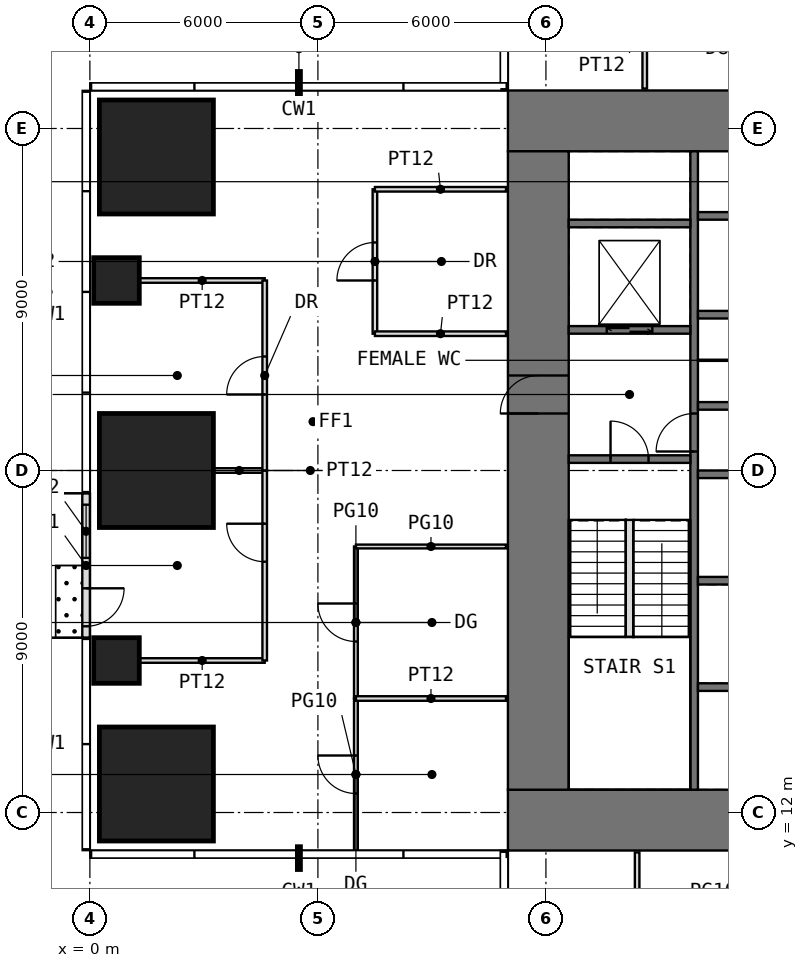
"""IFC4 building model, lengths in metres.
Left out: names, types, materials, properties, quantities, classifications, styles, units other than length and angle.
Written with IfcOpenShell. Run it as: python <this file> out.ifc"""

import sys

from ifc_helpers import new_model, si_unit, direction, frame, frame_2d, origin, origin_2d, place, context, subcontext, project, spatial, rectangle, extrude, element, fill, save


model = new_model("IFC4")
c1 = context("Model", 3, precision=1e-05, world=origin(), true_north=direction((0.0, 1.0)))
c2 = subcontext(c1, "Body", "Model", "MODEL_VIEW")
j1 = project(units=[si_unit("LENGTHUNIT", "METRE"), si_unit("PLANEANGLEUNIT", "RADIAN")], contexts=[c1])
p1 = place(None, origin())
s1 = spatial("IfcSite", under=j1, at=p1, CompositionType="ELEMENT")
p2 = place(p1, origin())
s2 = spatial("IfcBuilding", under=s1, at=p2, CompositionType="ELEMENT")
p3 = place(p2, frame((0.0, 0.0, 104.5)))
s3 = spatial("IfcBuildingStorey", under=s2, at=p3, CompositionType="ELEMENT", Elevation=104.5)
p4 = place(p3, frame((1.75, 12.75, 0.0), z_axis=(0.0, 0.0, 1.0), x_axis=(1.0, 0.0, 0.0)))
e1 = element("IfcColumn", 1, at=p4, inside=s3, PredefinedType="COLUMN", context=c2, shape_type="SweptSolid", body=[
    extrude(rectangle(XDim=3.0, YDim=3.0, at=origin_2d()), origin(), (0.0, 0.0, 1.0), 4.0),
])
p5 = place(p3, frame((0.7, 16.0, 0.0), z_axis=(0.0, 0.0, 1.0), x_axis=(1.0, 0.0, 0.0)))
e2 = element("IfcColumn", 2, at=p5, inside=s3, PredefinedType="COLUMN", context=c2, shape_type="SweptSolid", body=[
    extrude(rectangle(XDim=1.2, YDim=1.2, at=origin_2d()), origin(), (0.0, 0.0, 1.0), 4.0),
])
p6 = place(p3, frame((1.75, 21.0, 0.0), z_axis=(0.0, 0.0, 1.0), x_axis=(1.0, 0.0, 0.0)))
e3 = element("IfcColumn", 3, at=p6, inside=s3, PredefinedType="COLUMN", context=c2, shape_type="SweptSolid", body=[
    extrude(rectangle(XDim=3.0, YDim=3.0, at=origin_2d()), origin(), (0.0, 0.0, 1.0), 4.0),
])
p7 = place(p3, frame((0.7, 26.0, 0.0), z_axis=(0.0, 0.0, 1.0), x_axis=(1.0, 0.0, 0.0)))
e4 = element("IfcColumn", 4, at=p7, inside=s3, PredefinedType="COLUMN", context=c2, shape_type="SweptSolid", body=[
    extrude(rectangle(XDim=1.2, YDim=1.2, at=origin_2d()), origin(), (0.0, 0.0, 1.0), 4.0),
])
p8 = place(p3, frame((1.75, 29.25, 0.0), z_axis=(0.0, 0.0, 1.0), x_axis=(1.0, 0.0, 0.0)))
e5 = element("IfcColumn", 5, at=p8, inside=s3, PredefinedType="COLUMN", context=c2, shape_type="SweptSolid", body=[
    extrude(rectangle(XDim=3.0, YDim=3.0, at=origin_2d()), origin(), (0.0, 0.0, 1.0), 4.0),
])
p9 = place(p3, frame((-0.1, 20.4, 0.0), z_axis=(0.0, 0.0, 1.0), x_axis=(0.0, -1.0, 0.0)))
e6 = element("IfcWall", 6, at=p9, inside=s3, PredefinedType="USERDEFINED", context=c2, shape_type="SweptSolid", body=[
    extrude(rectangle(XDim=3.8, YDim=0.2, at=frame_2d((1.9, 0.0))), origin(), (0.0, 0.0, 1.0), 3.75),
])
p10 = place(p9, frame((2.5, 0.0, 0.0)))
e7 = element("IfcOpeningElement", 7, at=p10, cuts=e6, PredefinedType="OPENING", context=c2, shape_type="SweptSolid", body=[
    extrude(rectangle(XDim=1.0, YDim=2.4, at=frame_2d((0.5, 1.2))), frame((0.0, 0.11, 0.0), z_axis=(0.0, -1.0, 0.0), x_axis=(1.0, 0.0, 0.0)), (0.0, 0.0, 1.0), 0.22),
])
p11 = place(p9, frame((0.3, 0.0, 0.3)))
e8 = element("IfcOpeningElement", 8, at=p11, cuts=e6, PredefinedType="OPENING", context=c2, shape_type="SweptSolid", body=[
    extrude(rectangle(XDim=1.4, YDim=2.7, at=frame_2d((0.7, 1.35))), frame((0.0, 0.11, 0.0), z_axis=(0.0, -1.0, 0.0), x_axis=(1.0, 0.0, 0.0)), (0.0, 0.0, 1.0), 0.22),
])
p12 = place(p3, frame((11.0, 11.8, -0.05), z_axis=(0.0, 0.0, 1.0), x_axis=(1.0, 0.0, 0.0)))
e9 = element("IfcWall", 9, at=p12, inside=s3, PredefinedType="SHEAR", context=c2, shape_type="SweptSolid", body=[
    extrude(rectangle(XDim=20.0, YDim=1.6, at=frame_2d((10.0, 0.0))), origin(), (0.0, 0.0, 1.0), 4.0),
])
p13 = place(p12, frame((9.0, 0.0, 0.05)))
e10 = element("IfcOpeningElement", 10, at=p13, cuts=e9, PredefinedType="OPENING", context=c2, shape_type="SweptSolid", body=[
    extrude(rectangle(XDim=2.0, YDim=2.2, at=frame_2d((1.0, 1.1))), frame((0.0, 0.81, 0.0), z_axis=(0.0, -1.0, 0.0), x_axis=(1.0, 0.0, 0.0)), (0.0, 0.0, 1.0), 1.62),
])
p14 = place(p3, frame((11.0, 30.2, -0.05), z_axis=(0.0, 0.0, 1.0), x_axis=(1.0, 0.0, 0.0)))
e11 = element("IfcWall", 11, at=p14, inside=s3, PredefinedType="SHEAR", context=c2, shape_type="SweptSolid", body=[
    extrude(rectangle(XDim=20.0, YDim=1.6, at=frame_2d((10.0, 0.0))), origin(), (0.0, 0.0, 1.0), 4.0),
])
p15 = place(p14, frame((9.0, 0.0, 0.05)))
e12 = element("IfcOpeningElement", 12, at=p15, cuts=e11, PredefinedType="OPENING", context=c2, shape_type="SweptSolid", body=[
    extrude(rectangle(XDim=2.0, YDim=2.2, at=frame_2d((1.0, 1.1))), frame((0.0, 0.81, 0.0), z_axis=(0.0, -1.0, 0.0), x_axis=(1.0, 0.0, 0.0)), (0.0, 0.0, 1.0), 1.62),
])
p16 = place(p3, frame((11.8, 12.6, -0.05), z_axis=(0.0, 0.0, 1.0), x_axis=(0.0, 1.0, 0.0)))
e13 = element("IfcWall", 13, at=p16, inside=s3, PredefinedType="SHEAR", context=c2, shape_type="SweptSolid", body=[
    extrude(rectangle(XDim=16.8, YDim=1.6, at=frame_2d((8.4, 0.0))), origin(), (0.0, 0.0, 1.0), 4.0),
])
p17 = place(p16, frame((9.9, 0.0, 0.05)))
e14 = element("IfcOpeningElement", 14, at=p17, cuts=e13, PredefinedType="OPENING", context=c2, shape_type="SweptSolid", body=[
    extrude(rectangle(XDim=1.0, YDim=2.2, at=frame_2d((0.5, 1.1))), frame((0.0, 0.81, 0.0), z_axis=(0.0, -1.0, 0.0), x_axis=(1.0, 0.0, 0.0)), (0.0, 0.0, 1.0), 1.62),
])
p18 = place(p3, frame((15.9, 12.6, -0.05), z_axis=(0.0, 0.0, 1.0), x_axis=(0.0, 1.0, 0.0)))
e15 = element("IfcWall", 15, at=p18, inside=s3, PredefinedType="SHEAR", context=c2, shape_type="SweptSolid", body=[
    extrude(rectangle(XDim=16.8, YDim=0.2, at=frame_2d((8.4, 0.0))), origin(), (0.0, 0.0, 1.0), 4.0),
])
p19 = place(p18, frame((8.9, 0.0, 0.05)))
e16 = element("IfcOpeningElement", 16, at=p19, cuts=e15, PredefinedType="OPENING", context=c2, shape_type="SweptSolid", body=[
    extrude(rectangle(XDim=1.0, YDim=2.2, at=frame_2d((0.5, 1.1))), frame((0.0, 0.11, 0.0), z_axis=(0.0, -1.0, 0.0), x_axis=(1.0, 0.0, 0.0)), (0.0, 0.0, 1.0), 0.22),
])
p20 = place(p3, frame((12.6, 21.3, -0.05), z_axis=(0.0, 0.0, 1.0), x_axis=(1.0, 0.0, 0.0)))
e17 = element("IfcWall", 17, at=p20, inside=s3, PredefinedType="SHEAR", context=c2, shape_type="SweptSolid", body=[
    extrude(rectangle(XDim=3.2, YDim=0.2, at=frame_2d((1.6, 0.0))), origin(), (0.0, 0.0, 1.0), 4.0),
])
p21 = place(p20, frame((1.1, 0.0, 0.05)))
e18 = element("IfcOpeningElement", 18, at=p21, cuts=e17, PredefinedType="OPENING", context=c2, shape_type="SweptSolid", body=[
    extrude(rectangle(XDim=1.0, YDim=2.2, at=frame_2d((0.5, 1.1))), frame((0.0, 0.11, 0.0), z_axis=(0.0, -1.0, 0.0), x_axis=(1.0, 0.0, 0.0)), (0.0, 0.0, 1.0), 0.22),
])
p22 = place(p3, frame((12.6, 24.7, -0.05), z_axis=(0.0, 0.0, 1.0), x_axis=(1.0, 0.0, 0.0)))
e19 = element("IfcWall", 19, at=p22, inside=s3, PredefinedType="SHEAR", context=c2, shape_type="SweptSolid", body=[
    extrude(rectangle(XDim=3.2, YDim=0.2, at=frame_2d((1.6, 0.0))), origin(), (0.0, 0.0, 1.0), 4.0),
])
p23 = place(p22, frame((1.0, 0.0, 0.05)))
e20 = element("IfcOpeningElement", 20, at=p23, cuts=e19, PredefinedType="OPENING", context=c2, shape_type="SweptSolid", body=[
    extrude(rectangle(XDim=1.2, YDim=2.2, at=frame_2d((0.6, 1.1))), frame((0.0, 0.11, 0.0), z_axis=(0.0, -1.0, 0.0), x_axis=(1.0, 0.0, 0.0)), (0.0, 0.0, 1.0), 0.22),
])
for number, where, z_axis, x_axis in (
    (21, (12.6, 27.5, -0.05), (0.0, 0.0, 1.0), (1.0, 0.0, 0.0)),
    (22, (16.0, 15.3, -0.05), (0.0, 0.0, 1.0), (1.0, 0.0, 0.0)),
    (23, (16.0, 18.1, -0.05), (0.0, 0.0, 1.0), (1.0, 0.0, 0.0)),
    (24, (16.0, 20.9, -0.05), (0.0, 0.0, 1.0), (1.0, 0.0, 0.0)),
    (25, (16.0, 22.7, -0.05), (0.0, 0.0, 1.0), (1.0, 0.0, 0.0)),
    (26, (16.0, 25.1, -0.05), (0.0, 0.0, 1.0), (1.0, 0.0, 0.0)),
    (27, (16.0, 27.7, -0.05), (0.0, 0.0, 1.0), (1.0, 0.0, 0.0)),
):
    element("IfcWall", number, at=place(p3, frame(where, z_axis=z_axis, x_axis=x_axis)), inside=s3, PredefinedType="SHEAR", context=c2, shape_type="SweptSolid", body=[
        extrude(rectangle(XDim=3.2, YDim=0.2, at=frame_2d((1.6, 0.0))), origin(), (0.0, 0.0, 1.0), 4.0),
    ])
p24 = place(p3, frame((16.0, 23.9, 0.0), z_axis=(0.0, 0.0, 1.0), x_axis=(1.0, 0.0, 0.0)))
e28 = element("IfcWall", 28, at=p24, inside=s3, PredefinedType="PARTITIONING", context=c2, shape_type="SweptSolid", body=[
    extrude(rectangle(XDim=1.4, YDim=0.03, at=frame_2d((0.7, 0.0))), origin(), (0.0, 0.0, 1.0), 3.75),
])
for number, where, z_axis, x_axis in (
    (29, (1.31, 16.0, 0.0), (0.0, 0.0, 1.0), (1.0, 0.0, 0.0)),
    (30, (1.31, 26.0, 0.0), (0.0, 0.0, 1.0), (1.0, 0.0, 0.0)),
):
    element("IfcWall", number, at=place(p3, frame(where, z_axis=z_axis, x_axis=x_axis)), inside=s3, PredefinedType="PARTITIONING", context=c2, shape_type="SweptSolid", body=[
        extrude(rectangle(XDim=3.29, YDim=0.12, at=frame_2d((1.645, 0.0))), origin(), (0.0, 0.0, 1.0), 3.75),
    ])
p25 = place(p3, frame((3.26, 21.0, 0.0), z_axis=(0.0, 0.0, 1.0), x_axis=(1.0, 0.0, 0.0)))
e31 = element("IfcWall", 31, at=p25, inside=s3, PredefinedType="PARTITIONING", context=c2, shape_type="SweptSolid", body=[
    extrude(rectangle(XDim=1.34, YDim=0.12, at=frame_2d((0.67, 0.0))), origin(), (0.0, 0.0, 1.0), 3.75),
])
p26 = place(p3, frame((4.6, 16.0, 0.0), z_axis=(0.0, 0.0, 1.0), x_axis=(0.0, 1.0, 0.0)))
e32 = element("IfcWall", 32, at=p26, inside=s3, PredefinedType="PARTITIONING", context=c2, shape_type="SweptSolid", body=[
    extrude(rectangle(XDim=5.0, YDim=0.12, at=frame_2d((2.5, 0.0))), origin(), (0.0, 0.0, 1.0), 3.75),
])
p27 = place(p26, frame((2.6, 0.0, 0.0)))
e33 = element("IfcOpeningElement", 33, at=p27, cuts=e32, PredefinedType="OPENING", context=c2, shape_type="SweptSolid", body=[
    extrude(rectangle(XDim=1.0, YDim=2.2, at=frame_2d((0.5, 1.1))), frame((0.0, 0.07, 0.0), z_axis=(0.0, -1.0, 0.0), x_axis=(1.0, 0.0, 0.0)), (0.0, 0.0, 1.0), 0.14),
])
p28 = place(p3, frame((4.6, 21.0, 0.0), z_axis=(0.0, 0.0, 1.0), x_axis=(0.0, 1.0, 0.0)))
e34 = element("IfcWall", 34, at=p28, inside=s3, PredefinedType="PARTITIONING", context=c2, shape_type="SweptSolid", body=[
    extrude(rectangle(XDim=5.0, YDim=0.12, at=frame_2d((2.5, 0.0))), origin(), (0.0, 0.0, 1.0), 3.75),
])
p29 = place(p28, frame((2.0, 0.0, 0.0)))
e35 = element("IfcOpeningElement", 35, at=p29, cuts=e34, PredefinedType="OPENING", context=c2, shape_type="SweptSolid", body=[
    extrude(rectangle(XDim=1.0, YDim=2.2, at=frame_2d((0.5, 1.1))), frame((0.0, 0.07, 0.0), z_axis=(0.0, -1.0, 0.0), x_axis=(1.0, 0.0, 0.0)), (0.0, 0.0, 1.0), 0.14),
])
p30 = place(p3, frame((7.0, 11.0, 0.0), z_axis=(0.0, 0.0, 1.0), x_axis=(0.0, 1.0, 0.0)))
e36 = element("IfcWall", 36, at=p30, inside=s3, PredefinedType="PARTITIONING", context=c2, shape_type="SweptSolid", body=[
    extrude(rectangle(XDim=4.0, YDim=0.1, at=frame_2d((2.0, 0.0))), origin(), (0.0, 0.0, 1.0), 3.75),
])
p31 = place(p30, frame((1.5, 0.0, 0.0)))
e37 = element("IfcOpeningElement", 37, at=p31, cuts=e36, PredefinedType="OPENING", context=c2, shape_type="SweptSolid", body=[
    extrude(rectangle(XDim=1.0, YDim=2.4, at=frame_2d((0.5, 1.2))), frame((0.0, 0.06, 0.0), z_axis=(0.0, -1.0, 0.0), x_axis=(1.0, 0.0, 0.0)), (0.0, 0.0, 1.0), 0.12),
])
p32 = place(p3, frame((7.0, 15.0, 0.0), z_axis=(0.0, 0.0, 1.0), x_axis=(0.0, 1.0, 0.0)))
e38 = element("IfcWall", 38, at=p32, inside=s3, PredefinedType="PARTITIONING", context=c2, shape_type="SweptSolid", body=[
    extrude(rectangle(XDim=4.0, YDim=0.1, at=frame_2d((2.0, 0.0))), origin(), (0.0, 0.0, 1.0), 3.75),
])
p33 = place(p32, frame((1.5, 0.0, 0.0)))
e39 = element("IfcOpeningElement", 39, at=p33, cuts=e38, PredefinedType="OPENING", context=c2, shape_type="SweptSolid", body=[
    extrude(rectangle(XDim=1.0, YDim=2.4, at=frame_2d((0.5, 1.2))), frame((0.0, 0.06, 0.0), z_axis=(0.0, -1.0, 0.0), x_axis=(1.0, 0.0, 0.0)), (0.0, 0.0, 1.0), 0.12),
])
p34 = place(p3, frame((7.0, 15.0, 0.0), z_axis=(0.0, 0.0, 1.0), x_axis=(1.0, 0.0, 0.0)))
e40 = element("IfcWall", 40, at=p34, inside=s3, PredefinedType="PARTITIONING", context=c2, shape_type="SweptSolid", body=[
    extrude(rectangle(XDim=3.95, YDim=0.12, at=frame_2d((1.975, 0.0))), origin(), (0.0, 0.0, 1.0), 3.75),
])
p35 = place(p3, frame((7.0, 19.0, 0.0), z_axis=(0.0, 0.0, 1.0), x_axis=(1.0, 0.0, 0.0)))
e41 = element("IfcWall", 41, at=p35, inside=s3, PredefinedType="PARTITIONING", context=c2, shape_type="SweptSolid", body=[
    extrude(rectangle(XDim=3.95, YDim=0.1, at=frame_2d((1.975, 0.0))), origin(), (0.0, 0.0, 1.0), 3.75),
])
p36 = place(p3, frame((7.5, 24.6, 0.0), z_axis=(0.0, 0.0, 1.0), x_axis=(0.0, 1.0, 0.0)))
e42 = element("IfcWall", 42, at=p36, inside=s3, PredefinedType="PARTITIONING", context=c2, shape_type="SweptSolid", body=[
    extrude(rectangle(XDim=3.8, YDim=0.12, at=frame_2d((1.9, 0.0))), origin(), (0.0, 0.0, 1.0), 3.75),
])
p37 = place(p36, frame((1.4, 0.0, 0.0)))
e43 = element("IfcOpeningElement", 43, at=p37, cuts=e42, PredefinedType="OPENING", context=c2, shape_type="SweptSolid", body=[
    extrude(rectangle(XDim=1.0, YDim=2.2, at=frame_2d((0.5, 1.1))), frame((0.0, 0.07, 0.0), z_axis=(0.0, -1.0, 0.0), x_axis=(1.0, 0.0, 0.0)), (0.0, 0.0, 1.0), 0.14),
])
for number, where, z_axis, x_axis in (
    (44, (7.5, 24.6, 0.0), (0.0, 0.0, 1.0), (1.0, 0.0, 0.0)),
    (45, (7.5, 28.4, 0.0), (0.0, 0.0, 1.0), (1.0, 0.0, 0.0)),
):
    element("IfcWall", number, at=place(p3, frame(where, z_axis=z_axis, x_axis=x_axis)), inside=s3, PredefinedType="PARTITIONING", context=c2, shape_type="SweptSolid", body=[
        extrude(rectangle(XDim=3.45, YDim=0.12, at=frame_2d((1.725, 0.0))), origin(), (0.0, 0.0, 1.0), 3.75),
    ])
p38 = place(p3, frame((14.4, 7.0, 0.0), z_axis=(0.0, 0.0, 1.0), x_axis=(0.0, 1.0, 0.0)))
e46 = element("IfcWall", 46, at=p38, inside=s3, PredefinedType="PARTITIONING", context=c2, shape_type="SweptSolid", body=[
    extrude(rectangle(XDim=3.95, YDim=0.12, at=frame_2d((1.975, 0.0))), origin(), (0.0, 0.0, 1.0), 3.75),
])
p39 = place(p3, frame((14.6, 31.05, 0.0), z_axis=(0.0, 0.0, 1.0), x_axis=(0.0, 1.0, 0.0)))
e47 = element("IfcWall", 47, at=p39, inside=s3, PredefinedType="PARTITIONING", context=c2, shape_type="SweptSolid", body=[
    extrude(rectangle(XDim=3.45, YDim=0.12, at=frame_2d((1.725, 0.0))), origin(), (0.0, 0.0, 1.0), 3.75),
])
p40 = place(p3, frame((14.2, 16.62, 0.0), z_axis=(0.0, 0.0, 1.0), x_axis=(0.0, 1.0, 0.0)))
e48 = element("IfcWall", 48, at=p40, inside=s3, PredefinedType="PARTITIONING", context=c2, shape_type="SweptSolid", body=[
    extrude(rectangle(XDim=3.08, YDim=0.2, at=frame_2d((1.54, 0.0))), origin(), (0.0, 0.0, 1.0), 4.0),
])
p41 = place(p10, origin())
e49 = element("IfcDoor", 49, at=p41, inside=s3, OperationType="SINGLE_SWING_LEFT", PredefinedType="DOOR", context=c2, shape_type="SweptSolid", body=[
    extrude(rectangle(XDim=1.0, YDim=2.4, at=frame_2d((0.5, 1.2))), frame((0.0, 0.025, 0.0), z_axis=(0.0, -1.0, 0.0), x_axis=(1.0, 0.0, 0.0)), (0.0, 0.0, 1.0), 0.05),
])
fill(e7, e49)
p42 = place(p11, origin())
e50 = element("IfcWindow", 50, at=p42, inside=s3, PartitioningType="SINGLE_PANEL", PredefinedType="WINDOW", context=c2, shape_type="SweptSolid", body=[
    extrude(rectangle(XDim=1.4, YDim=2.7, at=frame_2d((0.7, 1.35))), frame((0.0, 0.03, 0.0), z_axis=(0.0, -1.0, 0.0), x_axis=(1.0, 0.0, 0.0)), (0.0, 0.0, 1.0), 0.06),
])
fill(e8, e50)
p43 = place(p17, origin())
e51 = element("IfcDoor", 51, at=p43, inside=s3, OperationType="SINGLE_SWING_LEFT", PredefinedType="DOOR", context=c2, shape_type="SweptSolid", body=[
    extrude(rectangle(XDim=1.0, YDim=2.2, at=frame_2d((0.5, 1.1))), frame((0.0, 0.025, 0.0), z_axis=(0.0, -1.0, 0.0), x_axis=(1.0, 0.0, 0.0)), (0.0, 0.0, 1.0), 0.05),
])
fill(e14, e51)
p44 = place(p21, origin())
e52 = element("IfcDoor", 52, at=p44, inside=s3, OperationType="SINGLE_SWING_LEFT", PredefinedType="DOOR", context=c2, shape_type="SweptSolid", body=[
    extrude(rectangle(XDim=1.0, YDim=2.2, at=frame_2d((0.5, 1.1))), frame((0.0, 0.025, 0.0), z_axis=(0.0, -1.0, 0.0), x_axis=(1.0, 0.0, 0.0)), (0.0, 0.0, 1.0), 0.05),
])
fill(e18, e52)
p45 = place(p19, origin())
e53 = element("IfcDoor", 53, at=p45, inside=s3, OperationType="SINGLE_SWING_LEFT", PredefinedType="DOOR", context=c2, shape_type="SweptSolid", body=[
    extrude(rectangle(XDim=1.0, YDim=2.2, at=frame_2d((0.5, 1.1))), frame((0.0, 0.025, 0.0), z_axis=(0.0, -1.0, 0.0), x_axis=(1.0, 0.0, 0.0)), (0.0, 0.0, 1.0), 0.05),
])
fill(e16, e53)
p46 = place(p31, origin())
e54 = element("IfcDoor", 54, at=p46, inside=s3, OperationType="SINGLE_SWING_RIGHT", PredefinedType="DOOR", context=c2, shape_type="SweptSolid", body=[
    extrude(rectangle(XDim=1.0, YDim=2.4, at=frame_2d((0.5, 1.2))), frame((0.0, 0.025, 0.0), z_axis=(0.0, -1.0, 0.0), x_axis=(1.0, 0.0, 0.0)), (0.0, 0.0, 1.0), 0.05),
])
fill(e37, e54)
p47 = place(p33, origin())
e55 = element("IfcDoor", 55, at=p47, inside=s3, OperationType="SINGLE_SWING_RIGHT", PredefinedType="DOOR", context=c2, shape_type="SweptSolid", body=[
    extrude(rectangle(XDim=1.0, YDim=2.4, at=frame_2d((0.5, 1.2))), frame((0.0, 0.025, 0.0), z_axis=(0.0, -1.0, 0.0), x_axis=(1.0, 0.0, 0.0)), (0.0, 0.0, 1.0), 0.05),
])
fill(e39, e55)
p48 = place(p37, origin())
e56 = element("IfcDoor", 56, at=p48, inside=s3, OperationType="SINGLE_SWING_LEFT", PredefinedType="DOOR", context=c2, shape_type="SweptSolid", body=[
    extrude(rectangle(XDim=1.0, YDim=2.2, at=frame_2d((0.5, 1.1))), frame((0.0, 0.025, 0.0), z_axis=(0.0, -1.0, 0.0), x_axis=(1.0, 0.0, 0.0)), (0.0, 0.0, 1.0), 0.05),
])
fill(e43, e56)
p49 = place(p27, origin())
e57 = element("IfcDoor", 57, at=p49, inside=s3, OperationType="SINGLE_SWING_RIGHT", PredefinedType="DOOR", context=c2, shape_type="SweptSolid", body=[
    extrude(rectangle(XDim=1.0, YDim=2.2, at=frame_2d((0.5, 1.1))), frame((0.0, 0.025, 0.0), z_axis=(0.0, -1.0, 0.0), x_axis=(1.0, 0.0, 0.0)), (0.0, 0.0, 1.0), 0.05),
])
fill(e33, e57)
p50 = place(p29, origin())
e58 = element("IfcDoor", 58, at=p50, inside=s3, OperationType="SINGLE_SWING_LEFT", PredefinedType="DOOR", context=c2, shape_type="SweptSolid", body=[
    extrude(rectangle(XDim=1.0, YDim=2.2, at=frame_2d((0.5, 1.1))), frame((0.0, 0.025, 0.0), z_axis=(0.0, -1.0, 0.0), x_axis=(1.0, 0.0, 0.0)), (0.0, 0.0, 1.0), 0.05),
])
fill(e35, e58)
p51 = place(p23, origin())
e59 = element("IfcDoor", 59, at=p51, inside=s3, OperationType="DOUBLE_DOOR_SLIDING", PredefinedType="DOOR", context=c2, shape_type="SweptSolid", body=[
    extrude(rectangle(XDim=1.2, YDim=2.2, at=frame_2d((0.6, 1.1))), frame((0.0, 0.025, 0.0), z_axis=(0.0, -1.0, 0.0), x_axis=(1.0, 0.0, 0.0)), (0.0, 0.0, 1.0), 0.05),
])
fill(e20, e59)
save(model, sys.argv[1])
